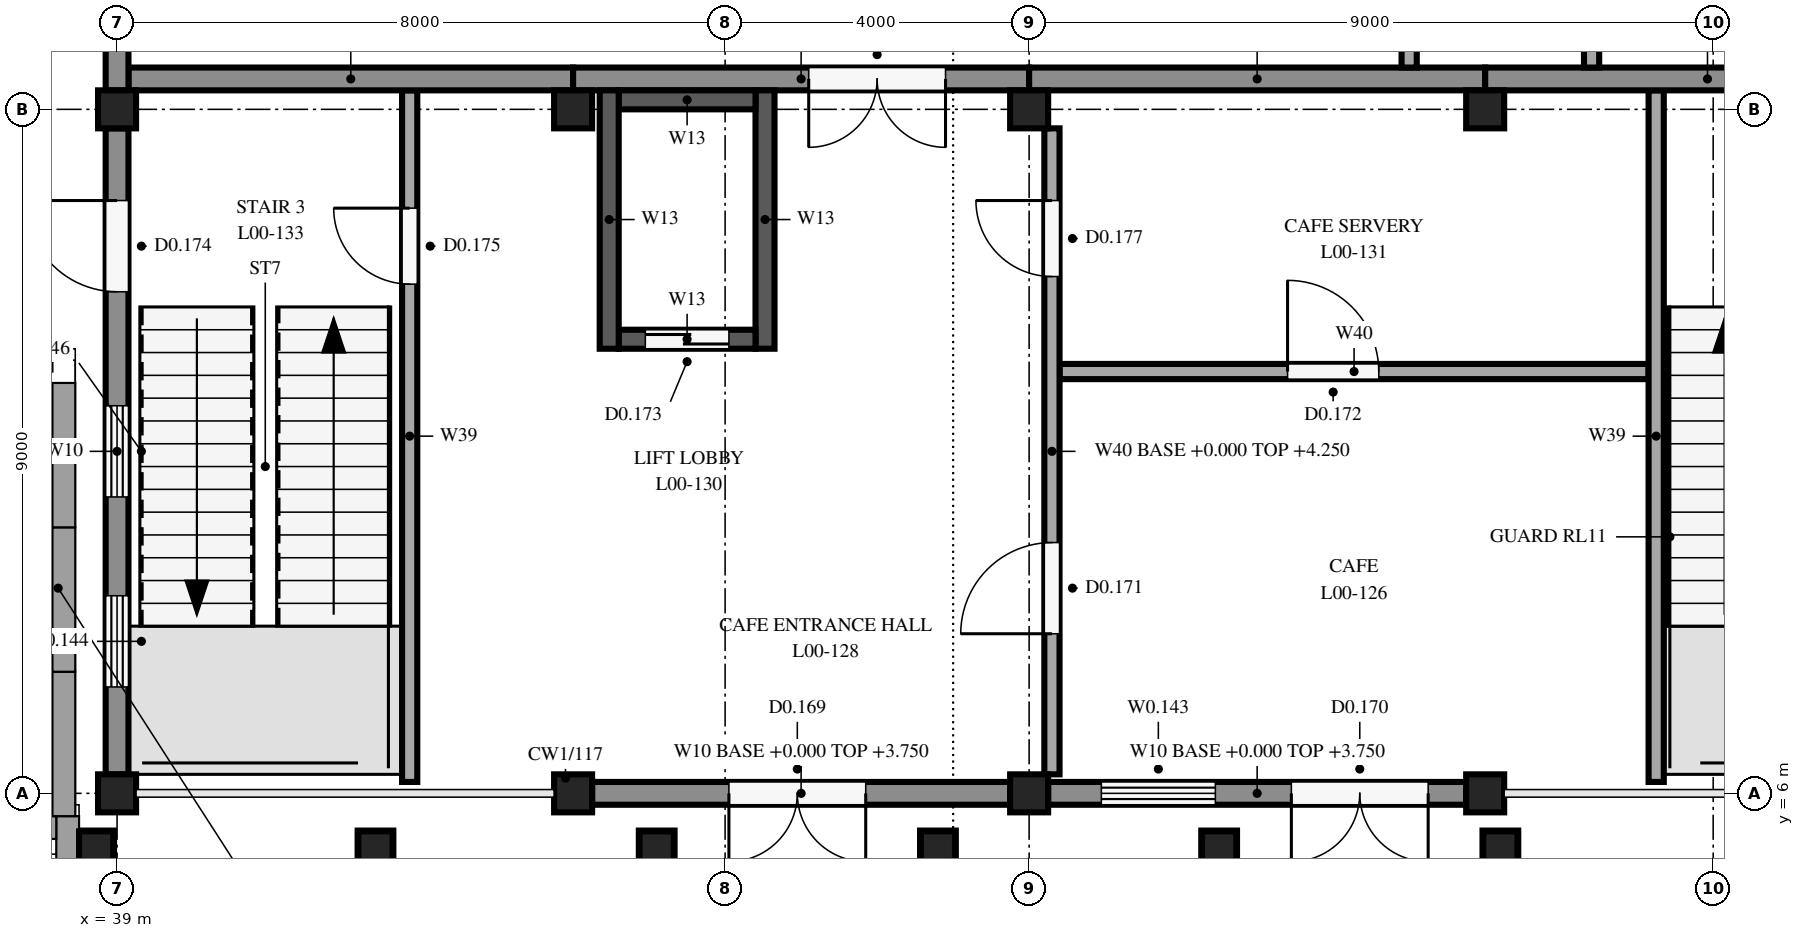
"""IFC4 building model, lengths in metres.
Left out: names, types, materials, properties, quantities, classifications, styles, units other than length and angle.
Written with IfcOpenShell. Run it as: python <this file> out.ifc"""

import sys

from ifc_helpers import new_model, si_unit, direction, frame, frame_2d, origin, origin_2d, place, context, subcontext, project, spatial, rectangle, extrude, element, fill, save


model = new_model("IFC4")
c1 = context("Model", 3, precision=1e-05, world=origin(), true_north=direction((0.0, 1.0)))
c2 = subcontext(c1, "Body", "Model", "MODEL_VIEW")
j1 = project(units=[si_unit("LENGTHUNIT", "METRE"), si_unit("PLANEANGLEUNIT", "RADIAN")], contexts=[c1])
p1 = place(None, origin())
s1 = spatial("IfcSite", under=j1, at=p1, CompositionType="ELEMENT")
p2 = place(p1, origin())
s2 = spatial("IfcBuilding", under=s1, at=p2, CompositionType="ELEMENT")
p3 = place(p2, origin())
s3 = spatial("IfcBuildingStorey", under=s2, at=p3, CompositionType="ELEMENT", Elevation=0.0)
for number, where, z_axis, x_axis in (
    (1, (39.0, 6.0, 0.0), (0.0, 0.0, 1.0), (1.0, 0.0, 0.0)),
    (2, (39.0, 15.0, 0.0), (0.0, 0.0, 1.0), (1.0, 0.0, 0.0)),
    (3, (45.0, 6.0, 0.0), (0.0, 0.0, 1.0), (1.0, 0.0, 0.0)),
    (4, (45.0, 15.0, 0.0), (0.0, 0.0, 1.0), (1.0, 0.0, 0.0)),
    (5, (51.0, 6.0, 0.0), (0.0, 0.0, 1.0), (1.0, 0.0, 0.0)),
    (6, (51.0, 15.0, 0.0), (0.0, 0.0, 1.0), (1.0, 0.0, 0.0)),
    (7, (57.0, 6.0, 0.0), (0.0, 0.0, 1.0), (1.0, 0.0, 0.0)),
    (8, (57.0, 15.0, 0.0), (0.0, 0.0, 1.0), (1.0, 0.0, 0.0)),
):
    element("IfcColumn", number, at=place(p3, frame(where, z_axis=z_axis, x_axis=x_axis)), inside=s3, PredefinedType="COLUMN", context=c2, shape_type="SweptSolid", body=[
        extrude(rectangle(XDim=0.5, YDim=0.5, at=origin_2d()), origin(), (0.0, 0.0, 1.0), 4.25),
    ])
p4 = place(p3, frame((50.75, 6.0, 0.0), z_axis=(0.0, 0.0, 1.0), x_axis=(-1.0, 0.0, 0.0)))
e9 = element("IfcWall", 9, at=p4, inside=s3, PredefinedType="SOLIDWALL", context=c2, shape_type="SweptSolid", body=[
    extrude(rectangle(XDim=5.5, YDim=0.3, at=frame_2d((2.75, 0.0))), origin(), (0.0, 0.0, 1.0), 3.75),
])
p5 = place(p4, frame((1.9, 0.0, 0.0)))
e10 = element("IfcOpeningElement", 10, at=p5, cuts=e9, PredefinedType="OPENING", context=c2, shape_type="SweptSolid", body=[
    extrude(rectangle(XDim=1.8, YDim=2.4, at=frame_2d((0.9, 1.2))), frame((0.0, 0.16, 0.0), z_axis=(0.0, -1.0, 0.0), x_axis=(1.0, 0.0, 0.0)), (0.0, 0.0, 1.0), 0.32),
])
p6 = place(p3, frame((56.75, 6.0, 0.0), z_axis=(0.0, 0.0, 1.0), x_axis=(-1.0, 0.0, 0.0)))
e11 = element("IfcWall", 11, at=p6, inside=s3, PredefinedType="SOLIDWALL", context=c2, shape_type="SweptSolid", body=[
    extrude(rectangle(XDim=5.5, YDim=0.3, at=frame_2d((2.75, 0.0))), origin(), (0.0, 0.0, 1.0), 3.75),
])
p7 = place(p6, frame((0.5, 0.0, 0.0)))
e12 = element("IfcOpeningElement", 12, at=p7, cuts=e11, PredefinedType="OPENING", context=c2, shape_type="SweptSolid", body=[
    extrude(rectangle(XDim=1.8, YDim=2.4, at=frame_2d((0.9, 1.2))), frame((0.0, 0.16, 0.0), z_axis=(0.0, -1.0, 0.0), x_axis=(1.0, 0.0, 0.0)), (0.0, 0.0, 1.0), 0.32),
])
p8 = place(p6, frame((3.3, 0.0, 0.6)))
e13 = element("IfcOpeningElement", 13, at=p8, cuts=e11, PredefinedType="OPENING", context=c2, shape_type="SweptSolid", body=[
    extrude(rectangle(XDim=1.5, YDim=2.8, at=frame_2d((0.75, 1.4))), frame((0.0, 0.16, 0.0), z_axis=(0.0, -1.0, 0.0), x_axis=(1.0, 0.0, 0.0)), (0.0, 0.0, 1.0), 0.32),
])
p9 = place(p3, frame((39.0, 6.25, 0.0), z_axis=(0.0, 0.0, 1.0), x_axis=(0.0, 1.0, 0.0)))
e14 = element("IfcWall", 14, at=p9, inside=s3, PredefinedType="SOLIDWALL", context=c2, shape_type="SweptSolid", body=[
    extrude(rectangle(XDim=8.5, YDim=0.3, at=frame_2d((4.25, 0.0))), origin(), (0.0, 0.0, 1.0), 3.7),
])
p10 = place(p9, frame((6.35, 0.0, 0.0)))
e15 = element("IfcOpeningElement", 15, at=p10, cuts=e14, PredefinedType="OPENING", context=c2, shape_type="SweptSolid", body=[
    extrude(rectangle(XDim=1.2, YDim=2.4, at=frame_2d((0.6, 1.2))), frame((0.0, 0.16, 0.0), z_axis=(0.0, -1.0, 0.0), x_axis=(1.0, 0.0, 0.0)), (0.0, 0.0, 1.0), 0.32),
])
p11 = place(p9, frame((1.15, 0.0, 1.0)))
e16 = element("IfcOpeningElement", 16, at=p11, cuts=e14, PredefinedType="OPENING", context=c2, shape_type="SweptSolid", body=[
    extrude(rectangle(XDim=1.2, YDim=1.5, at=frame_2d((0.6, 0.75))), frame((0.0, 0.16, 0.0), z_axis=(0.0, -1.0, 0.0), x_axis=(1.0, 0.0, 0.0)), (0.0, 0.0, 1.0), 0.32),
])
p12 = place(p9, frame((3.65, 0.0, 1.0)))
e17 = element("IfcOpeningElement", 17, at=p12, cuts=e14, PredefinedType="OPENING", context=c2, shape_type="SweptSolid", body=[
    extrude(rectangle(XDim=1.2, YDim=1.5, at=frame_2d((0.6, 0.75))), frame((0.0, 0.16, 0.0), z_axis=(0.0, -1.0, 0.0), x_axis=(1.0, 0.0, 0.0)), (0.0, 0.0, 1.0), 0.32),
])
p13 = place(p3, frame((45.0, 15.4, 0.0), z_axis=(0.0, 0.0, 1.0), x_axis=(-1.0, 0.0, 0.0)))
e18 = element("IfcWall", 18, at=p13, inside=s3, PredefinedType="SOLIDWALL", context=c2, shape_type="SweptSolid", body=[
    extrude(rectangle(XDim=5.85, YDim=0.3, at=frame_2d((2.925, 0.0))), origin(), (0.0, 0.0, 1.0), 4.5),
])
p14 = place(p3, frame((51.0, 15.4, 0.0), z_axis=(0.0, 0.0, 1.0), x_axis=(-1.0, 0.0, 0.0)))
e19 = element("IfcWall", 19, at=p14, inside=s3, PredefinedType="SOLIDWALL", context=c2, shape_type="SweptSolid", body=[
    extrude(rectangle(XDim=6.0, YDim=0.3, at=frame_2d((3.0, 0.0))), origin(), (0.0, 0.0, 1.0), 4.5),
])
p15 = place(p14, frame((1.1, 0.0, 0.0)))
e20 = element("IfcOpeningElement", 20, at=p15, cuts=e19, PredefinedType="OPENING", context=c2, shape_type="SweptSolid", body=[
    extrude(rectangle(XDim=1.8, YDim=2.4, at=frame_2d((0.9, 1.2))), frame((0.0, 0.16, 0.0), z_axis=(0.0, -1.0, 0.0), x_axis=(1.0, 0.0, 0.0)), (0.0, 0.0, 1.0), 0.32),
])
p16 = place(p3, frame((57.0, 15.4, 0.0), z_axis=(0.0, 0.0, 1.0), x_axis=(-1.0, 0.0, 0.0)))
e21 = element("IfcWall", 21, at=p16, inside=s3, PredefinedType="SOLIDWALL", context=c2, shape_type="SweptSolid", body=[
    extrude(rectangle(XDim=6.0, YDim=0.3, at=frame_2d((3.0, 0.0))), origin(), (0.0, 0.0, 1.0), 4.5),
])
p17 = place(p3, frame((62.85, 15.4, 0.0), z_axis=(0.0, 0.0, 1.0), x_axis=(-1.0, 0.0, 0.0)))
e22 = element("IfcWall", 22, at=p17, inside=s3, PredefinedType="SOLIDWALL", context=c2, shape_type="SweptSolid", body=[
    extrude(rectangle(XDim=5.85, YDim=0.3, at=frame_2d((2.925, 0.0))), origin(), (0.0, 0.0, 1.0), 4.5),
])
for number, where, z_axis, x_axis in (
    (23, (45.475, 11.85, -1.6), (0.0, 0.0, 1.0), (0.0, 1.0, 0.0)),
    (24, (47.525, 11.85, -1.6), (0.0, 0.0, 1.0), (0.0, 1.0, 0.0)),
):
    element("IfcWall", number, at=place(p3, frame(where, z_axis=z_axis, x_axis=x_axis)), inside=s3, PredefinedType="SHEAR", context=c2, shape_type="SweptSolid", body=[
        extrude(rectangle(XDim=3.4, YDim=0.25, at=frame_2d((1.7, 0.0))), origin(), (0.0, 0.0, 1.0), 6.1),
    ])
p18 = place(p3, frame((45.6, 11.975, -1.6), z_axis=(0.0, 0.0, 1.0), x_axis=(1.0, 0.0, 0.0)))
e25 = element("IfcWall", 25, at=p18, inside=s3, PredefinedType="SHEAR", context=c2, shape_type="SweptSolid", body=[
    extrude(rectangle(XDim=1.8, YDim=0.25, at=frame_2d((0.9, 0.0))), origin(), (0.0, 0.0, 1.0), 6.1),
])
p19 = place(p18, frame((0.35, 0.0, 1.6)))
e26 = element("IfcOpeningElement", 26, at=p19, cuts=e25, PredefinedType="OPENING", context=c2, shape_type="SweptSolid", body=[
    extrude(rectangle(XDim=1.1, YDim=2.1, at=frame_2d((0.55, 1.05))), frame((0.0, 0.135, 0.0), z_axis=(0.0, -1.0, 0.0), x_axis=(1.0, 0.0, 0.0)), (0.0, 0.0, 1.0), 0.27),
])
p20 = place(p3, frame((45.6, 15.125, -1.6), z_axis=(0.0, 0.0, 1.0), x_axis=(1.0, 0.0, 0.0)))
e27 = element("IfcWall", 27, at=p20, inside=s3, PredefinedType="SHEAR", context=c2, shape_type="SweptSolid", body=[
    extrude(rectangle(XDim=1.8, YDim=0.25, at=frame_2d((0.9, 0.0))), origin(), (0.0, 0.0, 1.0), 6.1),
])
p21 = place(p3, frame((39.0, 15.25, 0.0), z_axis=(0.0, 0.0, 1.0), x_axis=(0.0, 1.0, 0.0)))
e28 = element("IfcWall", 28, at=p21, inside=s3, PredefinedType="SOLIDWALL", context=c2, shape_type="SweptSolid", body=[
    extrude(rectangle(XDim=5.5, YDim=0.3, at=frame_2d((2.75, 0.0))), origin(), (0.0, 0.0, 1.0), 4.5),
])
p22 = place(p21, frame((1.0, 0.0, 0.6)))
e29 = element("IfcOpeningElement", 29, at=p22, cuts=e28, PredefinedType="OPENING", context=c2, shape_type="SweptSolid", body=[
    extrude(rectangle(XDim=1.5, YDim=3.4, at=frame_2d((0.75, 1.7))), frame((0.0, 0.16, 0.0), z_axis=(0.0, -1.0, 0.0), x_axis=(1.0, 0.0, 0.0)), (0.0, 0.0, 1.0), 0.32),
])
p23 = place(p21, frame((3.0, 0.0, 0.6)))
e30 = element("IfcOpeningElement", 30, at=p23, cuts=e28, PredefinedType="OPENING", context=c2, shape_type="SweptSolid", body=[
    extrude(rectangle(XDim=1.5, YDim=3.4, at=frame_2d((0.75, 1.7))), frame((0.0, 0.16, 0.0), z_axis=(0.0, -1.0, 0.0), x_axis=(1.0, 0.0, 0.0)), (0.0, 0.0, 1.0), 0.32),
])
for number, where, z_axis, x_axis in (
    (31, (38.725, 5.275, -0.3), (0.0, 0.0, 1.0), (1.0, 0.0, 0.0)),
    (32, (42.4, 5.275, -0.3), (0.0, 0.0, 1.0), (1.0, 0.0, 0.0)),
    (33, (46.1, 5.275, -0.3), (0.0, 0.0, 1.0), (1.0, 0.0, 0.0)),
    (34, (49.8, 5.275, -0.3), (0.0, 0.0, 1.0), (1.0, 0.0, 0.0)),
    (35, (53.5, 5.275, -0.3), (0.0, 0.0, 1.0), (1.0, 0.0, 0.0)),
    (36, (57.2, 5.275, -0.3), (0.0, 0.0, 1.0), (1.0, 0.0, 0.0)),
):
    element("IfcColumn", number, at=place(p3, frame(where, z_axis=z_axis, x_axis=x_axis)), inside=s3, PredefinedType="COLUMN", context=c2, shape_type="SweptSolid", body=[
        extrude(rectangle(XDim=0.45, YDim=0.45, at=origin_2d()), origin(), (0.0, 0.0, 1.0), 3.95),
    ])
p24 = place(p3, frame((42.85, 6.15, 0.0), z_axis=(0.0, 0.0, 1.0), x_axis=(0.0, 1.0, 0.0)))
e37 = element("IfcWall", 37, at=p24, inside=s3, PredefinedType="SOLIDWALL", context=c2, shape_type="SweptSolid", body=[
    extrude(rectangle(XDim=9.1, YDim=0.2, at=frame_2d((4.55, 0.0))), origin(), (0.0, 0.0, 1.0), 4.25),
])
p25 = place(p24, frame((6.55, 0.0, 0.0)))
e38 = element("IfcOpeningElement", 38, at=p25, cuts=e37, PredefinedType="OPENING", context=c2, shape_type="SweptSolid", body=[
    extrude(rectangle(XDim=1.0, YDim=2.1, at=frame_2d((0.5, 1.05))), frame((0.0, 0.11, 0.0), z_axis=(0.0, -1.0, 0.0), x_axis=(1.0, 0.0, 0.0)), (0.0, 0.0, 1.0), 0.22),
])
p26 = place(p3, frame((59.25, 6.15, 0.0), z_axis=(0.0, 0.0, 1.0), x_axis=(0.0, 1.0, 0.0)))
e39 = element("IfcWall", 39, at=p26, inside=s3, PredefinedType="SOLIDWALL", context=c2, shape_type="SweptSolid", body=[
    extrude(rectangle(XDim=9.1, YDim=0.2, at=frame_2d((4.55, 0.0))), origin(), (0.0, 0.0, 1.0), 4.25),
])
p27 = place(p3, frame((51.3, 6.25, 0.0), z_axis=(0.0, 0.0, 1.0), x_axis=(0.0, 1.0, 0.0)))
e40 = element("IfcWall", 40, at=p27, inside=s3, PredefinedType="PARTITIONING", context=c2, shape_type="SweptSolid", body=[
    extrude(rectangle(XDim=8.5, YDim=0.2, at=frame_2d((4.25, 0.0))), origin(), (0.0, 0.0, 1.0), 4.25),
])
p28 = place(p27, frame((1.85, 0.0, 0.0)))
e41 = element("IfcOpeningElement", 41, at=p28, cuts=e40, PredefinedType="OPENING", context=c2, shape_type="SweptSolid", body=[
    extrude(rectangle(XDim=1.2, YDim=2.1, at=frame_2d((0.6, 1.05))), frame((0.0, 0.11, 0.0), z_axis=(0.0, -1.0, 0.0), x_axis=(1.0, 0.0, 0.0)), (0.0, 0.0, 1.0), 0.22),
])
p29 = place(p27, frame((6.55, 0.0, 0.0)))
e42 = element("IfcOpeningElement", 42, at=p29, cuts=e40, PredefinedType="OPENING", context=c2, shape_type="SweptSolid", body=[
    extrude(rectangle(XDim=1.0, YDim=2.1, at=frame_2d((0.5, 1.05))), frame((0.0, 0.11, 0.0), z_axis=(0.0, -1.0, 0.0), x_axis=(1.0, 0.0, 0.0)), (0.0, 0.0, 1.0), 0.22),
])
p30 = place(p3, frame((51.4, 11.55, 0.0), z_axis=(0.0, 0.0, 1.0), x_axis=(1.0, 0.0, 0.0)))
e43 = element("IfcWall", 43, at=p30, inside=s3, PredefinedType="PARTITIONING", context=c2, shape_type="SweptSolid", body=[
    extrude(rectangle(XDim=7.75, YDim=0.2, at=frame_2d((3.875, 0.0))), origin(), (0.0, 0.0, 1.0), 3.7),
])
p31 = place(p30, frame((3.0, 0.0, 0.0)))
e44 = element("IfcOpeningElement", 44, at=p31, cuts=e43, PredefinedType="OPENING", context=c2, shape_type="SweptSolid", body=[
    extrude(rectangle(XDim=1.2, YDim=2.1, at=frame_2d((0.6, 1.05))), frame((0.0, 0.11, 0.0), z_axis=(0.0, -1.0, 0.0), x_axis=(1.0, 0.0, 0.0)), (0.0, 0.0, 1.0), 0.22),
])
for number, where, z_axis, x_axis in (
    (45, (56.0, 15.55, 0.0), (0.0, 0.0, 1.0), (0.0, 1.0, 0.0)),
    (46, (58.4, 15.55, 0.0), (0.0, 0.0, 1.0), (0.0, 1.0, 0.0)),
):
    element("IfcWall", number, at=place(p3, frame(where, z_axis=z_axis, x_axis=x_axis)), inside=s3, PredefinedType="PARTITIONING", context=c2, shape_type="SweptSolid", body=[
        extrude(rectangle(XDim=2.35, YDim=0.2, at=frame_2d((1.175, 0.0))), origin(), (0.0, 0.0, 1.0), 5.4),
    ])
p32 = place(p5, origin())
e47 = element("IfcDoor", 47, at=p32, inside=s3, OperationType="DOUBLE_DOOR_SINGLE_SWING", PredefinedType="NOTDEFINED", context=c2, shape_type="SweptSolid", body=[
    extrude(rectangle(XDim=1.8, YDim=2.4, at=frame_2d((0.9, 1.2))), frame((0.0, 0.025, 0.0), z_axis=(0.0, -1.0, 0.0), x_axis=(1.0, 0.0, 0.0)), (0.0, 0.0, 1.0), 0.05),
])
fill(e10, e47)
p33 = place(p7, origin())
e48 = element("IfcDoor", 48, at=p33, inside=s3, OperationType="DOUBLE_DOOR_SINGLE_SWING", PredefinedType="NOTDEFINED", context=c2, shape_type="SweptSolid", body=[
    extrude(rectangle(XDim=1.8, YDim=2.4, at=frame_2d((0.9, 1.2))), frame((0.0, 0.025, 0.0), z_axis=(0.0, -1.0, 0.0), x_axis=(1.0, 0.0, 0.0)), (0.0, 0.0, 1.0), 0.05),
])
fill(e12, e48)
p34 = place(p8, origin())
e49 = element("IfcWindow", 49, at=p34, inside=s3, PartitioningType="SINGLE_PANEL", PredefinedType="WINDOW", context=c2, shape_type="SweptSolid", body=[
    extrude(rectangle(XDim=1.5, YDim=2.8, at=frame_2d((0.75, 1.4))), frame((0.0, 0.03, 0.0), z_axis=(0.0, -1.0, 0.0), x_axis=(1.0, 0.0, 0.0)), (0.0, 0.0, 1.0), 0.06),
])
fill(e13, e49)
p35 = place(p10, origin())
e50 = element("IfcDoor", 50, at=p35, inside=s3, OperationType="SINGLE_SWING_RIGHT", PredefinedType="NOTDEFINED", context=c2, shape_type="SweptSolid", body=[
    extrude(rectangle(XDim=1.2, YDim=2.4, at=frame_2d((0.6, 1.2))), frame((0.0, 0.025, 0.0), z_axis=(0.0, -1.0, 0.0), x_axis=(1.0, 0.0, 0.0)), (0.0, 0.0, 1.0), 0.05),
])
fill(e15, e50)
p36 = place(p11, origin())
e51 = element("IfcWindow", 51, at=p36, inside=s3, PartitioningType="SINGLE_PANEL", PredefinedType="WINDOW", context=c2, shape_type="SweptSolid", body=[
    extrude(rectangle(XDim=1.2, YDim=1.5, at=frame_2d((0.6, 0.75))), frame((0.0, 0.03, 0.0), z_axis=(0.0, -1.0, 0.0), x_axis=(1.0, 0.0, 0.0)), (0.0, 0.0, 1.0), 0.06),
])
fill(e16, e51)
p37 = place(p12, origin())
e52 = element("IfcWindow", 52, at=p37, inside=s3, PartitioningType="SINGLE_PANEL", PredefinedType="WINDOW", context=c2, shape_type="SweptSolid", body=[
    extrude(rectangle(XDim=1.2, YDim=1.5, at=frame_2d((0.6, 0.75))), frame((0.0, 0.03, 0.0), z_axis=(0.0, -1.0, 0.0), x_axis=(1.0, 0.0, 0.0)), (0.0, 0.0, 1.0), 0.06),
])
fill(e17, e52)
p38 = place(p15, origin())
e53 = element("IfcDoor", 53, at=p38, inside=s3, OperationType="DOUBLE_DOOR_SINGLE_SWING", PredefinedType="NOTDEFINED", context=c2, shape_type="SweptSolid", body=[
    extrude(rectangle(XDim=1.8, YDim=2.4, at=frame_2d((0.9, 1.2))), frame((0.0, 0.025, 0.0), z_axis=(0.0, -1.0, 0.0), x_axis=(1.0, 0.0, 0.0)), (0.0, 0.0, 1.0), 0.05),
])
fill(e20, e53)
p39 = place(p28, origin())
e54 = element("IfcDoor", 54, at=p39, inside=s3, OperationType="SINGLE_SWING_LEFT", PredefinedType="NOTDEFINED", context=c2, shape_type="SweptSolid", body=[
    extrude(rectangle(XDim=1.2, YDim=2.1, at=frame_2d((0.6, 1.05))), frame((0.0, 0.025, 0.0), z_axis=(0.0, -1.0, 0.0), x_axis=(1.0, 0.0, 0.0)), (0.0, 0.0, 1.0), 0.05),
])
fill(e41, e54)
p40 = place(p29, origin())
e55 = element("IfcDoor", 55, at=p40, inside=s3, OperationType="SINGLE_SWING_RIGHT", PredefinedType="NOTDEFINED", context=c2, shape_type="SweptSolid", body=[
    extrude(rectangle(XDim=1.0, YDim=2.1, at=frame_2d((0.5, 1.05))), frame((0.0, 0.025, 0.0), z_axis=(0.0, -1.0, 0.0), x_axis=(1.0, 0.0, 0.0)), (0.0, 0.0, 1.0), 0.05),
])
fill(e42, e55)
p41 = place(p31, origin())
e56 = element("IfcDoor", 56, at=p41, inside=s3, OperationType="SINGLE_SWING_LEFT", PredefinedType="NOTDEFINED", context=c2, shape_type="SweptSolid", body=[
    extrude(rectangle(XDim=1.2, YDim=2.1, at=frame_2d((0.6, 1.05))), frame((0.0, 0.025, 0.0), z_axis=(0.0, -1.0, 0.0), x_axis=(1.0, 0.0, 0.0)), (0.0, 0.0, 1.0), 0.05),
])
fill(e44, e56)
p42 = place(p25, origin())
e57 = element("IfcDoor", 57, at=p42, inside=s3, OperationType="SINGLE_SWING_RIGHT", PredefinedType="NOTDEFINED", context=c2, shape_type="SweptSolid", body=[
    extrude(rectangle(XDim=1.0, YDim=2.1, at=frame_2d((0.5, 1.05))), frame((0.0, 0.025, 0.0), z_axis=(0.0, -1.0, 0.0), x_axis=(1.0, 0.0, 0.0)), (0.0, 0.0, 1.0), 0.05),
])
fill(e38, e57)
p43 = place(p19, origin())
e58 = element("IfcDoor", 58, at=p43, inside=s3, OperationType="SLIDING_TO_LEFT", PredefinedType="NOTDEFINED", context=c2, shape_type="SweptSolid", body=[
    extrude(rectangle(XDim=1.1, YDim=2.1, at=frame_2d((0.55, 1.05))), frame((0.0, 0.025, 0.0), z_axis=(0.0, -1.0, 0.0), x_axis=(1.0, 0.0, 0.0)), (0.0, 0.0, 1.0), 0.05),
])
fill(e26, e58)
save(model, sys.argv[1])
